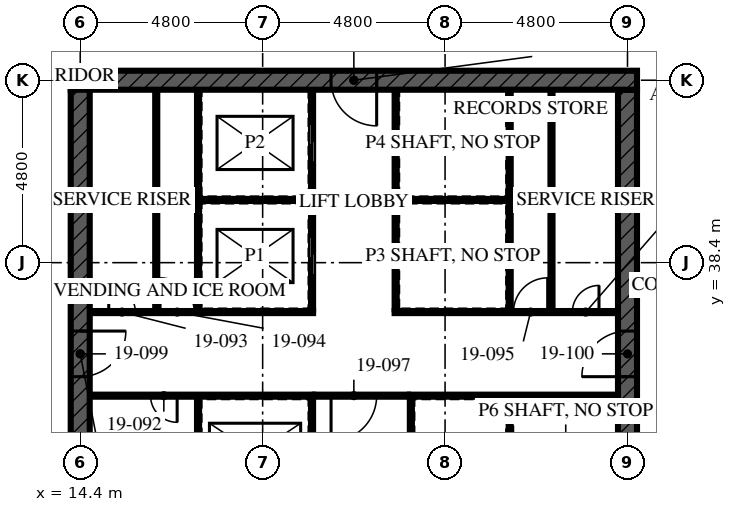
"""IFC4 building model, lengths in metres.
Left out: names, types, materials, properties, quantities, classifications, styles, units other than length and angle.
Written with IfcOpenShell. Run it as: python <this file> out.ifc"""

import sys

from ifc_helpers import new_model, si_unit, direction, frame, frame_2d, origin, place, context, subcontext, project, spatial, rectangle, extrude, element, fill, save


model = new_model("IFC4")
c1 = context("Model", 3, precision=1e-05, world=origin(), true_north=direction((0.0, 1.0)))
c2 = subcontext(c1, "Body", "Model", "MODEL_VIEW")
j1 = project(units=[si_unit("LENGTHUNIT", "METRE"), si_unit("PLANEANGLEUNIT", "RADIAN")], contexts=[c1])
p1 = place(None, origin())
s1 = spatial("IfcSite", under=j1, at=p1, CompositionType="ELEMENT")
p2 = place(p1, origin())
s2 = spatial("IfcBuilding", under=s1, at=p2, CompositionType="ELEMENT")
p3 = place(p2, frame((0.0, 0.0, 72.5)))
s3 = spatial("IfcBuildingStorey", under=s2, at=p3, CompositionType="ELEMENT", Elevation=72.5)
p4 = place(p3, frame((29.05, 43.2, -0.17), z_axis=(0.0, 0.0, 1.0), x_axis=(-1.0, 0.0, 0.0)))
e1 = element("IfcWall", 1, at=p4, inside=s3, PredefinedType="SHEAR", context=c2, shape_type="SweptSolid", body=[
    extrude(rectangle(XDim=14.9, YDim=0.5, at=frame_2d((7.45, 0.0))), origin(), (0.0, 0.0, 1.0), 3.5),
])
p5 = place(p4, frame((6.85, 0.0, 0.17)))
e2 = element("IfcOpeningElement", 2, at=p5, cuts=e1, PredefinedType="OPENING", context=c2, shape_type="SweptSolid", body=[
    extrude(rectangle(XDim=1.2, YDim=2.1, at=frame_2d((0.6, 1.05))), frame((0.0, 0.26, 0.0), z_axis=(0.0, -1.0, 0.0), x_axis=(1.0, 0.0, 0.0)), (0.0, 0.0, 1.0), 0.521),
])
p6 = place(p3, frame((14.4, 42.95, -0.17), z_axis=(0.0, 0.0, 1.0), x_axis=(0.0, -1.0, 0.0)))
e3 = element("IfcWall", 3, at=p6, inside=s3, PredefinedType="SHEAR", context=c2, shape_type="SweptSolid", body=[
    extrude(rectangle(XDim=13.9, YDim=0.5, at=frame_2d((6.95, 0.0))), origin(), (0.0, 0.0, 1.0), 3.5),
])
p7 = place(p6, frame((6.35, 0.0, 0.17)))
e4 = element("IfcOpeningElement", 4, at=p7, cuts=e3, PredefinedType="OPENING", context=c2, shape_type="SweptSolid", body=[
    extrude(rectangle(XDim=1.2, YDim=2.1, at=frame_2d((0.6, 1.05))), frame((0.0, 0.26, 0.0), z_axis=(0.0, -1.0, 0.0), x_axis=(1.0, 0.0, 0.0)), (0.0, 0.0, 1.0), 0.521),
])
p8 = place(p3, frame((28.8, 29.05, -0.17), z_axis=(0.0, 0.0, 1.0), x_axis=(0.0, 1.0, 0.0)))
e5 = element("IfcWall", 5, at=p8, inside=s3, PredefinedType="SHEAR", context=c2, shape_type="SweptSolid", body=[
    extrude(rectangle(XDim=13.9, YDim=0.5, at=frame_2d((6.95, 0.0))), origin(), (0.0, 0.0, 1.0), 3.5),
])
p9 = place(p8, frame((6.35, 0.0, 0.17)))
e6 = element("IfcOpeningElement", 6, at=p9, cuts=e5, PredefinedType="OPENING", context=c2, shape_type="SweptSolid", body=[
    extrude(rectangle(XDim=1.2, YDim=2.1, at=frame_2d((0.6, 1.05))), frame((0.0, 0.26, 0.0), z_axis=(0.0, -1.0, 0.0), x_axis=(1.0, 0.0, 0.0)), (0.0, 0.0, 1.0), 0.521),
])
for number, where, z_axis, x_axis in (
    (7, (16.4, 37.15, 0.0), (0.0, 0.0, 1.0), (0.0, 1.0, 0.0)),
    (8, (26.8, 37.15, 0.0), (0.0, 0.0, 1.0), (0.0, 1.0, 0.0)),
):
    element("IfcWall", number, at=place(p3, frame(where, z_axis=z_axis, x_axis=x_axis)), inside=s3, PredefinedType="SOLIDWALL", context=c2, shape_type="SweptSolid", body=[
        extrude(rectangle(XDim=5.8, YDim=0.1, at=frame_2d((2.9, 0.0))), origin(), (0.0, 0.0, 1.0), 3.33),
    ])
p10 = place(p3, frame((20.5, 29.05, 0.0), z_axis=(0.0, 0.0, 1.0), x_axis=(0.0, 1.0, 0.0)))
e9 = element("IfcWall", 9, at=p10, inside=s3, PredefinedType="SOLIDWALL", context=c2, shape_type="SweptSolid", body=[
    extrude(rectangle(XDim=5.8, YDim=0.1, at=frame_2d((2.9, 0.0))), origin(), (0.0, 0.0, 1.0), 3.33),
])
p11 = place(p10, frame((0.8, 0.0, 0.0)))
e10 = element("IfcOpeningElement", 10, at=p11, cuts=e9, PredefinedType="OPENING", context=c2, shape_type="SweptSolid", body=[
    extrude(rectangle(XDim=1.1, YDim=2.3, at=frame_2d((0.55, 1.15))), frame((0.0, 0.061, 0.0), z_axis=(0.0, -1.0, 0.0), x_axis=(1.0, 0.0, 0.0)), (0.0, 0.0, 1.0), 0.121),
])
p12 = place(p10, frame((3.775, 0.0, 0.0)))
e11 = element("IfcOpeningElement", 11, at=p12, cuts=e9, PredefinedType="OPENING", context=c2, shape_type="SweptSolid", body=[
    extrude(rectangle(XDim=1.1, YDim=2.3, at=frame_2d((0.55, 1.15))), frame((0.0, 0.061, 0.0), z_axis=(0.0, -1.0, 0.0), x_axis=(1.0, 0.0, 0.0)), (0.0, 0.0, 1.0), 0.121),
])
p13 = place(p3, frame((20.5, 37.15, 0.0), z_axis=(0.0, 0.0, 1.0), x_axis=(0.0, 1.0, 0.0)))
e12 = element("IfcWall", 12, at=p13, inside=s3, PredefinedType="SOLIDWALL", context=c2, shape_type="SweptSolid", body=[
    extrude(rectangle(XDim=5.8, YDim=0.1, at=frame_2d((2.9, 0.0))), origin(), (0.0, 0.0, 1.0), 3.33),
])
p14 = place(p13, frame((0.925, 0.0, 0.0)))
e13 = element("IfcOpeningElement", 13, at=p14, cuts=e12, PredefinedType="OPENING", context=c2, shape_type="SweptSolid", body=[
    extrude(rectangle(XDim=1.0, YDim=2.1, at=frame_2d((0.5, 1.05))), frame((0.0, 0.061, 0.0), z_axis=(0.0, -1.0, 0.0), x_axis=(1.0, 0.0, 0.0)), (0.0, 0.0, 1.0), 0.121),
])
p15 = place(p13, frame((3.9, 0.0, 0.0)))
e14 = element("IfcOpeningElement", 14, at=p15, cuts=e12, PredefinedType="OPENING", context=c2, shape_type="SweptSolid", body=[
    extrude(rectangle(XDim=1.0, YDim=2.1, at=frame_2d((0.5, 1.05))), frame((0.0, 0.061, 0.0), z_axis=(0.0, -1.0, 0.0), x_axis=(1.0, 0.0, 0.0)), (0.0, 0.0, 1.0), 0.121),
])
p16 = place(p3, frame((22.7, 37.15, 0.0), z_axis=(0.0, 0.0, 1.0), x_axis=(0.0, 1.0, 0.0)))
e15 = element("IfcWall", 15, at=p16, inside=s3, PredefinedType="SOLIDWALL", context=c2, shape_type="SweptSolid", body=[
    extrude(rectangle(XDim=5.8, YDim=0.1, at=frame_2d((2.9, 0.0))), origin(), (0.0, 0.0, 1.0), 3.33),
])
p17 = place(p3, frame((23.1, 29.05, 0.0), z_axis=(0.0, 0.0, 1.0), x_axis=(0.0, 1.0, 0.0)))
e16 = element("IfcWall", 16, at=p17, inside=s3, PredefinedType="SOLIDWALL", context=c2, shape_type="SweptSolid", body=[
    extrude(rectangle(XDim=5.8, YDim=0.1, at=frame_2d((2.9, 0.0))), origin(), (0.0, 0.0, 1.0), 3.33),
])
p18 = place(p17, frame((1.0, 0.0, 0.0)))
e17 = element("IfcOpeningElement", 17, at=p18, cuts=e16, PredefinedType="OPENING", context=c2, shape_type="SweptSolid", body=[
    extrude(rectangle(XDim=0.7, YDim=2.1, at=frame_2d((0.35, 1.05))), frame((0.0, 0.061, 0.0), z_axis=(0.0, -1.0, 0.0), x_axis=(1.0, 0.0, 0.0)), (0.0, 0.0, 1.0), 0.121),
])
p19 = place(p3, frame((14.65, 34.9, 0.0), z_axis=(0.0, 0.0, 1.0), x_axis=(1.0, 0.0, 0.0)))
e18 = element("IfcWall", 18, at=p19, inside=s3, PredefinedType="SOLIDWALL", context=c2, shape_type="SweptSolid", body=[
    extrude(rectangle(XDim=5.9, YDim=0.1, at=frame_2d((2.95, 0.0))), origin(), (0.0, 0.0, 1.0), 3.33),
])
p20 = place(p19, frame((1.6, 0.0, 0.0)))
e19 = element("IfcOpeningElement", 19, at=p20, cuts=e18, PredefinedType="OPENING", context=c2, shape_type="SweptSolid", body=[
    extrude(rectangle(XDim=0.7, YDim=2.1, at=frame_2d((0.35, 1.05))), frame((0.0, 0.061, 0.0), z_axis=(0.0, -1.0, 0.0), x_axis=(1.0, 0.0, 0.0)), (0.0, 0.0, 1.0), 0.121),
])
p21 = place(p3, frame((23.05, 34.9, 0.0), z_axis=(0.0, 0.0, 1.0), x_axis=(1.0, 0.0, 0.0)))
e20 = element("IfcWall", 20, at=p21, inside=s3, PredefinedType="SOLIDWALL", context=c2, shape_type="SweptSolid", body=[
    extrude(rectangle(XDim=5.5, YDim=0.1, at=frame_2d((2.75, 0.0))), origin(), (0.0, 0.0, 1.0), 3.33),
])
p22 = place(p3, frame((14.65, 37.1, 0.0), z_axis=(0.0, 0.0, 1.0), x_axis=(1.0, 0.0, 0.0)))
e21 = element("IfcWall", 21, at=p22, inside=s3, PredefinedType="SOLIDWALL", context=c2, shape_type="SweptSolid", body=[
    extrude(rectangle(XDim=5.9, YDim=0.1, at=frame_2d((2.95, 0.0))), origin(), (0.0, 0.0, 1.0), 3.33),
])
p23 = place(p22, frame((0.5, 0.0, 0.0)))
e22 = element("IfcOpeningElement", 22, at=p23, cuts=e21, PredefinedType="OPENING", context=c2, shape_type="SweptSolid", body=[
    extrude(rectangle(XDim=0.7, YDim=2.1, at=frame_2d((0.35, 1.05))), frame((0.0, 0.061, 0.0), z_axis=(0.0, -1.0, 0.0), x_axis=(1.0, 0.0, 0.0)), (0.0, 0.0, 1.0), 0.121),
])
p24 = place(p22, frame((1.85, 0.0, 0.0)))
e23 = element("IfcOpeningElement", 23, at=p24, cuts=e21, PredefinedType="OPENING", context=c2, shape_type="SweptSolid", body=[
    extrude(rectangle(XDim=0.9, YDim=2.1, at=frame_2d((0.45, 1.05))), frame((0.0, 0.061, 0.0), z_axis=(0.0, -1.0, 0.0), x_axis=(1.0, 0.0, 0.0)), (0.0, 0.0, 1.0), 0.121),
])
p25 = place(p3, frame((22.65, 37.1, 0.0), z_axis=(0.0, 0.0, 1.0), x_axis=(1.0, 0.0, 0.0)))
e24 = element("IfcWall", 24, at=p25, inside=s3, PredefinedType="SOLIDWALL", context=c2, shape_type="SweptSolid", body=[
    extrude(rectangle(XDim=5.9, YDim=0.1, at=frame_2d((2.95, 0.0))), origin(), (0.0, 0.0, 1.0), 3.33),
])
p26 = place(p25, frame((3.15, 0.0, 0.0)))
e25 = element("IfcOpeningElement", 25, at=p26, cuts=e24, PredefinedType="OPENING", context=c2, shape_type="SweptSolid", body=[
    extrude(rectangle(XDim=0.9, YDim=2.1, at=frame_2d((0.45, 1.05))), frame((0.0, 0.061, 0.0), z_axis=(0.0, -1.0, 0.0), x_axis=(1.0, 0.0, 0.0)), (0.0, 0.0, 1.0), 0.121),
])
p27 = place(p25, frame((4.7, 0.0, 0.0)))
e26 = element("IfcOpeningElement", 26, at=p27, cuts=e24, PredefinedType="OPENING", context=c2, shape_type="SweptSolid", body=[
    extrude(rectangle(XDim=0.7, YDim=2.1, at=frame_2d((0.35, 1.05))), frame((0.0, 0.061, 0.0), z_axis=(0.0, -1.0, 0.0), x_axis=(1.0, 0.0, 0.0)), (0.0, 0.0, 1.0), 0.121),
])
p28 = place(p3, frame((20.55, 34.9, 0.0), z_axis=(0.0, 0.0, 1.0), x_axis=(1.0, 0.0, 0.0)))
e27 = element("IfcWall", 27, at=p28, inside=s3, PredefinedType="SOLIDWALL", context=c2, shape_type="SweptSolid", body=[
    extrude(rectangle(XDim=2.5, YDim=0.1, at=frame_2d((1.25, 0.0))), origin(), (0.0, 0.0, 1.0), 3.33),
])
p29 = place(p28, frame((0.45, 0.0, 0.0)))
e28 = element("IfcOpeningElement", 28, at=p29, cuts=e27, PredefinedType="OPENING", context=c2, shape_type="SweptSolid", body=[
    extrude(rectangle(XDim=1.2, YDim=2.1, at=frame_2d((0.6, 1.05))), frame((0.0, 0.061, 0.0), z_axis=(0.0, -1.0, 0.0), x_axis=(1.0, 0.0, 0.0)), (0.0, 0.0, 1.0), 0.121),
])
for number, where, z_axis, x_axis in (
    (29, (17.5, 29.05, 0.0), (0.0, 0.0, 1.0), (0.0, 1.0, 0.0)),
    (30, (17.5, 37.15, 0.0), (0.0, 0.0, 1.0), (0.0, 1.0, 0.0)),
):
    element("IfcWall", number, at=place(p3, frame(where, z_axis=z_axis, x_axis=x_axis)), inside=s3, PredefinedType="SOLIDWALL", context=c2, shape_type="SweptSolid", body=[
        extrude(rectangle(XDim=5.8, YDim=0.1, at=frame_2d((2.9, 0.0))), origin(), (0.0, 0.0, 1.0), 3.33),
    ])
for number, where, z_axis, x_axis in (
    (31, (17.55, 40.05, 0.0), (0.0, 0.0, 1.0), (1.0, 0.0, 0.0)),
    (32, (22.75, 40.05, 0.0), (0.0, 0.0, 1.0), (1.0, 0.0, 0.0)),
):
    element("IfcWall", number, at=place(p3, frame(where, z_axis=z_axis, x_axis=x_axis)), inside=s3, PredefinedType="SOLIDWALL", context=c2, shape_type="SweptSolid", body=[
        extrude(rectangle(XDim=2.9, YDim=0.1, at=frame_2d((1.45, 0.0))), origin(), (0.0, 0.0, 1.0), 3.33),
    ])
p30 = place(p3, frame((25.7, 37.15, 0.0), z_axis=(0.0, 0.0, 1.0), x_axis=(0.0, 1.0, 0.0)))
e33 = element("IfcWall", 33, at=p30, inside=s3, PredefinedType="SOLIDWALL", context=c2, shape_type="SweptSolid", body=[
    extrude(rectangle(XDim=5.8, YDim=0.1, at=frame_2d((2.9, 0.0))), origin(), (0.0, 0.0, 1.0), 3.33),
])
p31 = place(p3, frame((25.7, 31.95, 0.0), z_axis=(0.0, 0.0, 1.0), x_axis=(0.0, 1.0, 0.0)))
e34 = element("IfcWall", 34, at=p31, inside=s3, PredefinedType="SOLIDWALL", context=c2, shape_type="SweptSolid", body=[
    extrude(rectangle(XDim=2.9, YDim=0.1, at=frame_2d((1.45, 0.0))), origin(), (0.0, 0.0, 1.0), 3.33),
])
p32 = place(p14, origin())
e35 = element("IfcDoor", 35, at=p32, inside=s3, OperationType="SLIDING_TO_LEFT", PredefinedType="DOOR", context=c2, shape_type="SweptSolid", body=[
    extrude(rectangle(XDim=1.0, YDim=2.1, at=frame_2d((0.5, 1.05))), frame((0.0, 0.05, 0.0), z_axis=(0.0, -1.0, 0.0), x_axis=(1.0, 0.0, 0.0)), (0.0, 0.0, 1.0), 0.1),
])
fill(e13, e35)
p33 = place(p15, origin())
e36 = element("IfcDoor", 36, at=p33, inside=s3, OperationType="SLIDING_TO_LEFT", PredefinedType="DOOR", context=c2, shape_type="SweptSolid", body=[
    extrude(rectangle(XDim=1.0, YDim=2.1, at=frame_2d((0.5, 1.05))), frame((0.0, 0.05, 0.0), z_axis=(0.0, -1.0, 0.0), x_axis=(1.0, 0.0, 0.0)), (0.0, 0.0, 1.0), 0.1),
])
fill(e14, e36)
p34 = place(p20, frame((0.7, 0.0, 0.0), z_axis=(0.0, 0.0, 1.0), x_axis=(-1.0, 0.0, 0.0)))
e37 = element("IfcDoor", 37, at=p34, inside=s3, OperationType="SINGLE_SWING_RIGHT", PredefinedType="DOOR", context=c2, shape_type="SweptSolid", body=[
    extrude(rectangle(XDim=0.7, YDim=2.1, at=frame_2d((0.35, 1.05))), frame((0.0, 0.027, 0.0), z_axis=(0.0, -1.0, 0.0), x_axis=(1.0, 0.0, 0.0)), (0.0, 0.0, 1.0), 0.054),
])
fill(e19, e37)
p35 = place(p23, origin())
e38 = element("IfcDoor", 38, at=p35, inside=s3, OperationType="SINGLE_SWING_RIGHT", PredefinedType="DOOR", context=c2, shape_type="SweptSolid", body=[
    extrude(rectangle(XDim=0.7, YDim=2.1, at=frame_2d((0.35, 1.05))), frame((0.0, 0.027, 0.0), z_axis=(0.0, -1.0, 0.0), x_axis=(1.0, 0.0, 0.0)), (0.0, 0.0, 1.0), 0.054),
])
fill(e22, e38)
p36 = place(p24, origin())
e39 = element("IfcDoor", 39, at=p36, inside=s3, OperationType="SINGLE_SWING_RIGHT", PredefinedType="DOOR", context=c2, shape_type="SweptSolid", body=[
    extrude(rectangle(XDim=0.9, YDim=2.1, at=frame_2d((0.45, 1.05))), frame((0.0, 0.027, 0.0), z_axis=(0.0, -1.0, 0.0), x_axis=(1.0, 0.0, 0.0)), (0.0, 0.0, 1.0), 0.054),
])
fill(e23, e39)
p37 = place(p26, origin())
e40 = element("IfcDoor", 40, at=p37, inside=s3, OperationType="SINGLE_SWING_LEFT", PredefinedType="DOOR", context=c2, shape_type="SweptSolid", body=[
    extrude(rectangle(XDim=0.9, YDim=2.1, at=frame_2d((0.45, 1.05))), frame((0.0, 0.027, 0.0), z_axis=(0.0, -1.0, 0.0), x_axis=(1.0, 0.0, 0.0)), (0.0, 0.0, 1.0), 0.054),
])
fill(e25, e40)
p38 = place(p27, origin())
e41 = element("IfcDoor", 41, at=p38, inside=s3, OperationType="SINGLE_SWING_LEFT", PredefinedType="DOOR", context=c2, shape_type="SweptSolid", body=[
    extrude(rectangle(XDim=0.7, YDim=2.1, at=frame_2d((0.35, 1.05))), frame((0.0, 0.027, 0.0), z_axis=(0.0, -1.0, 0.0), x_axis=(1.0, 0.0, 0.0)), (0.0, 0.0, 1.0), 0.054),
])
fill(e26, e41)
p39 = place(p29, frame((1.2, 0.0, 0.0), z_axis=(0.0, 0.0, 1.0), x_axis=(-1.0, 0.0, 0.0)))
e42 = element("IfcDoor", 42, at=p39, inside=s3, OperationType="SINGLE_SWING_LEFT", PredefinedType="DOOR", context=c2, shape_type="SweptSolid", body=[
    extrude(rectangle(XDim=1.2, YDim=2.1, at=frame_2d((0.6, 1.05))), frame((0.0, 0.027, 0.0), z_axis=(0.0, -1.0, 0.0), x_axis=(1.0, 0.0, 0.0)), (0.0, 0.0, 1.0), 0.054),
])
fill(e28, e42)
p40 = place(p7, origin())
e43 = element("IfcDoor", 43, at=p40, inside=s3, OperationType="SINGLE_SWING_LEFT", PredefinedType="DOOR", context=c2, shape_type="SweptSolid", body=[
    extrude(rectangle(XDim=1.2, YDim=2.1, at=frame_2d((0.6, 1.05))), frame((0.0, 0.027, 0.0), z_axis=(0.0, -1.0, 0.0), x_axis=(1.0, 0.0, 0.0)), (0.0, 0.0, 1.0), 0.054),
])
fill(e4, e43)
p41 = place(p9, origin())
e44 = element("IfcDoor", 44, at=p41, inside=s3, OperationType="SINGLE_SWING_LEFT", PredefinedType="DOOR", context=c2, shape_type="SweptSolid", body=[
    extrude(rectangle(XDim=1.2, YDim=2.1, at=frame_2d((0.6, 1.05))), frame((0.0, 0.027, 0.0), z_axis=(0.0, -1.0, 0.0), x_axis=(1.0, 0.0, 0.0)), (0.0, 0.0, 1.0), 0.054),
])
fill(e6, e44)
p42 = place(p5, origin())
e45 = element("IfcDoor", 45, at=p42, inside=s3, OperationType="SINGLE_SWING_LEFT", PredefinedType="DOOR", context=c2, shape_type="SweptSolid", body=[
    extrude(rectangle(XDim=1.2, YDim=2.1, at=frame_2d((0.6, 1.05))), frame((0.0, 0.027, 0.0), z_axis=(0.0, -1.0, 0.0), x_axis=(1.0, 0.0, 0.0)), (0.0, 0.0, 1.0), 0.054),
])
fill(e2, e45)
save(model, sys.argv[1])
